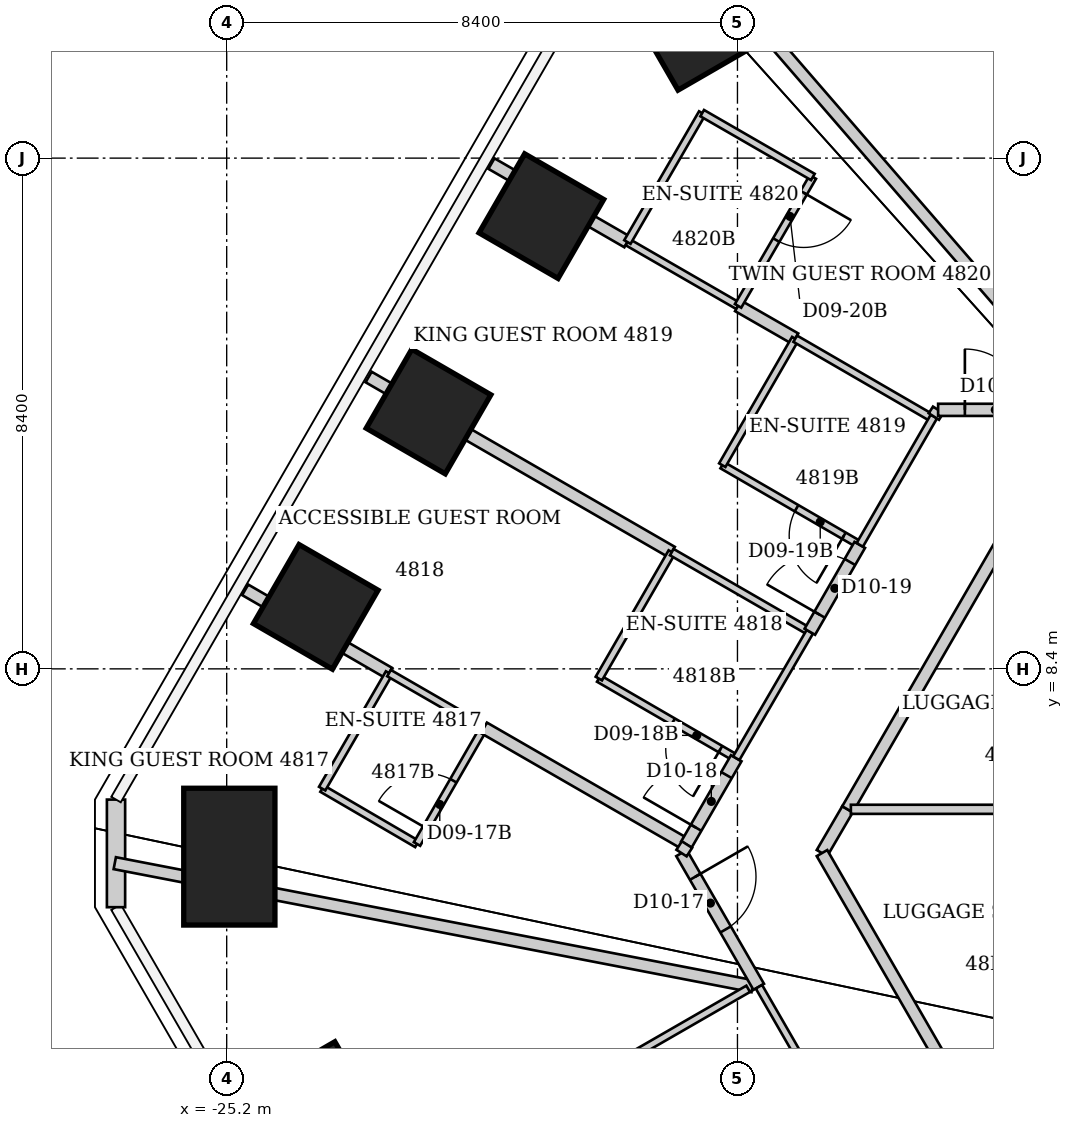
"""IFC4 building model, lengths in metres.
Left out: names, types, materials, properties, quantities, classifications, styles, units other than length and angle.
Written with IfcOpenShell. Run it as: python <this file> out.ifc"""

import sys

from ifc_helpers import new_model, si_unit, direction, frame, frame_2d, origin, origin_2d, place, context, subcontext, project, spatial, rectangle, extrude, element, fill, save


model = new_model("IFC4")
c1 = context("Model", 3, precision=1e-05, world=origin(), true_north=direction((0.0, 1.0)))
c2 = subcontext(c1, "Body", "Model", "MODEL_VIEW")
j1 = project(units=[si_unit("LENGTHUNIT", "METRE"), si_unit("PLANEANGLEUNIT", "RADIAN")], contexts=[c1])
p1 = place(None, origin())
s1 = spatial("IfcSite", under=j1, at=p1, CompositionType="ELEMENT")
p2 = place(p1, origin())
s2 = spatial("IfcBuilding", under=s1, at=p2, CompositionType="ELEMENT")
p3 = place(p2, frame((0.0, 0.0, 194.6)))
s3 = spatial("IfcBuildingStorey", under=s2, at=p3, CompositionType="ELEMENT", Elevation=194.6)
p4 = place(p3, frame((-23.696, 1.242, 0.0), z_axis=(0.0, 0.0, 1.0), x_axis=(-0.866025403784, -0.5, 0.0)))
e1 = element("IfcColumn", 1, at=p4, inside=s3, PredefinedType="COLUMN", context=c2, shape_type="SweptSolid", body=[
    extrude(rectangle(XDim=1.5, YDim=1.5, at=origin_2d()), origin(), (0.0, 0.0, 1.0), 3.8),
])
p5 = place(p3, frame((-25.156, 5.311, 0.0), z_axis=(0.0, 0.0, 1.0), x_axis=(-1.0, 0.0, 0.0)))
e2 = element("IfcColumn", 2, at=p5, inside=s3, PredefinedType="COLUMN", context=c2, shape_type="SweptSolid", body=[
    extrude(rectangle(XDim=1.5, YDim=2.25, at=origin_2d()), origin(), (0.0, 0.0, 1.0), 3.8),
])
for number, where, z_axis, x_axis in (
    (3, (-23.735, 9.419, 0.0), (0.0, 0.0, 1.0), (-0.866, 0.5, 0.0)),
    (4, (-21.88, 12.633, 0.0), (0.0, 0.0, 1.0), (-0.866, 0.5, 0.0)),
    (5, (-20.025, 15.846, 0.0), (0.0, 0.0, 1.0), (-0.866, 0.5, 0.0)),
):
    element("IfcColumn", number, at=place(p3, frame(where, z_axis=z_axis, x_axis=x_axis)), inside=s3, PredefinedType="COLUMN", context=c2, shape_type="SweptSolid", body=[
        extrude(rectangle(XDim=1.5, YDim=1.5, at=origin_2d()), origin(), (0.0, 0.0, 1.0), 3.8),
    ])
p6 = place(p3, frame((-17.178, 19.131, 0.0), z_axis=(0.0, 0.0, 1.0), x_axis=(-0.5, 0.866025403784, 0.0)))
e6 = element("IfcColumn", 6, at=p6, inside=s3, PredefinedType="COLUMN", context=c2, shape_type="SweptSolid", body=[
    extrude(rectangle(XDim=1.5, YDim=2.25, at=origin_2d()), origin(), (0.0, 0.0, 1.0), 3.8),
])
p7 = place(p3, frame((-27.02, 4.48, 0.0), z_axis=(0.0, 0.0, 1.0), x_axis=(0.0, 1.0, 0.0)))
e7 = element("IfcWall", 7, at=p7, inside=s3, PredefinedType="SOLIDWALL", context=c2, shape_type="SweptSolid", body=[
    extrude(rectangle(XDim=1.77, YDim=0.3, at=frame_2d((0.885, 0.0))), origin(), (0.0, 0.0, 1.0), 3.64),
])
p8 = place(p3, frame((-27.041, 5.204, 0.0), z_axis=(0.0, 0.0, 1.0), x_axis=(0.981884490433, -0.18948046719, 0.0)))
e8 = element("IfcWall", 8, at=p8, inside=s3, PredefinedType="PARTITIONING", context=c2, shape_type="SweptSolid", body=[
    extrude(rectangle(XDim=10.684, YDim=0.2, at=frame_2d((5.342, 0.0))), origin(), (0.0, 0.0, 1.0), 3.64),
])
p9 = place(p3, frame((-24.896, 9.7, 0.0), z_axis=(0.0, 0.0, 1.0), x_axis=(0.865432398871, -0.501025710902, 0.0)))
e9 = element("IfcWall", 9, at=p9, inside=s3, PredefinedType="PARTITIONING", context=c2, shape_type="SweptSolid", body=[
    extrude(rectangle(XDim=2.734, YDim=0.2, at=frame_2d((1.367, 0.0))), origin(), (0.0, 0.0, 1.0), 3.64),
])
p10 = place(p3, frame((-23.63, 6.43, 0.0), z_axis=(0.0, 0.0, 1.0), x_axis=(0.863773997337, -0.503879431535, 0.0)))
e10 = element("IfcWall", 10, at=p10, inside=s3, PredefinedType="PARTITIONING", context=c2, shape_type="SweptSolid", body=[
    extrude(rectangle(XDim=1.806, YDim=0.12, at=frame_2d((0.903, 0.0))), origin(), (0.0, 0.0, 1.0), 3.64),
])
p11 = place(p3, frame((-22.866, 13.2, 0.0), z_axis=(0.0, 0.0, 1.0), x_axis=(0.865937714159, -0.500151852138, 0.0)))
e11 = element("IfcWall", 11, at=p11, inside=s3, PredefinedType="PARTITIONING", context=c2, shape_type="SweptSolid", body=[
    extrude(rectangle(XDim=5.758, YDim=0.2, at=frame_2d((2.879, 0.0))), origin(), (0.0, 0.0, 1.0), 2.878),
])
p12 = place(p3, frame((-22.53, 8.33, 0.0), z_axis=(0.0, 0.0, 1.0), x_axis=(-0.500957366999, -0.865471961677, 0.0)))
e12 = element("IfcWall", 12, at=p12, inside=s3, PredefinedType="PARTITIONING", context=c2, shape_type="SweptSolid", body=[
    extrude(rectangle(XDim=2.196, YDim=0.12, at=frame_2d((1.098, 0.0))), origin(), (0.0, 0.0, 1.0), 3.64),
])
p13 = place(p3, frame((-22.53, 8.33, 0.0), z_axis=(0.0, 0.0, 1.0), x_axis=(0.866158505053, -0.499769390944, 0.0)))
e13 = element("IfcWall", 13, at=p13, inside=s3, PredefinedType="PARTITIONING", context=c2, shape_type="SweptSolid", body=[
    extrude(rectangle(XDim=1.801, YDim=0.12, at=frame_2d((0.9, 0.0))), origin(), (0.0, 0.0, 1.0), 3.64),
])
p14 = place(p3, frame((-22.07, 5.52, 0.0), z_axis=(0.0, 0.0, 1.0), x_axis=(0.499118212815, 0.866533905648, 0.0)))
e14 = element("IfcWall", 14, at=p14, inside=s3, PredefinedType="PARTITIONING", context=c2, shape_type="SweptSolid", body=[
    extrude(rectangle(XDim=2.204, YDim=0.12, at=frame_2d((1.102, 0.0))), origin(), (0.0, 0.0, 1.0), 3.64),
])
p15 = place(p14, frame((0.3, 0.0, 0.0)))
e15 = element("IfcOpeningElement", 15, at=p15, cuts=e14, PredefinedType="OPENING", context=c2, shape_type="SweptSolid", body=[
    extrude(rectangle(XDim=0.9, YDim=2.03, at=frame_2d((0.45, 1.015))), frame((0.0, 0.06, 0.0), z_axis=(0.0, -1.0, 0.0), x_axis=(1.0, 0.0, 0.0)), (0.0, 0.0, 1.0), 0.12),
])
p16 = place(p3, frame((-20.97, 7.43, 0.0), z_axis=(0.0, 0.0, 1.0), x_axis=(0.866325681624, -0.499479542482, 0.0)))
e16 = element("IfcWall", 16, at=p16, inside=s3, PredefinedType="PARTITIONING", context=c2, shape_type="SweptSolid", body=[
    extrude(rectangle(XDim=3.829, YDim=0.2, at=frame_2d((1.914, 0.0))), origin(), (0.0, 0.0, 1.0), 3.64),
])
p17 = place(p3, frame((-20.846, 16.71, 0.0), z_axis=(0.0, 0.0, 1.0), x_axis=(0.866163541035, -0.499760662899, 0.0)))
e17 = element("IfcWall", 17, at=p17, inside=s3, PredefinedType="PARTITIONING", context=c2, shape_type="SweptSolid", body=[
    extrude(rectangle(XDim=2.581, YDim=0.2, at=frame_2d((1.291, 0.0))), origin(), (0.0, 0.0, 1.0), 3.64),
])
p18 = place(p3, frame((-19.08, 8.24, 0.0), z_axis=(0.0, 0.0, 1.0), x_axis=(0.865155281359, -0.50150407689, 0.0)))
e18 = element("IfcWall", 18, at=p18, inside=s3, PredefinedType="PARTITIONING", context=c2, shape_type="SweptSolid", body=[
    extrude(rectangle(XDim=2.612, YDim=0.12, at=frame_2d((1.306, 0.0))), origin(), (0.0, 0.0, 1.0), 3.64),
])
p19 = place(p18, frame((1.412, 0.0, 0.0)))
e19 = element("IfcOpeningElement", 19, at=p19, cuts=e18, PredefinedType="OPENING", context=c2, shape_type="SweptSolid", body=[
    extrude(rectangle(XDim=0.9, YDim=2.03, at=frame_2d((0.45, 1.015))), frame((0.0, 0.06, 0.0), z_axis=(0.0, -1.0, 0.0), x_axis=(1.0, 0.0, 0.0)), (0.0, 0.0, 1.0), 0.12),
])
p20 = place(p3, frame((-18.61, 15.42, 0.0), z_axis=(0.0, 0.0, 1.0), x_axis=(0.86618365172, -0.499725806311, 0.0)))
e20 = element("IfcWall", 20, at=p20, inside=s3, PredefinedType="PARTITIONING", context=c2, shape_type="SweptSolid", body=[
    extrude(rectangle(XDim=2.101, YDim=0.12, at=frame_2d((1.051, 0.0))), origin(), (0.0, 0.0, 1.0), 3.64),
])
p21 = place(p3, frame((-17.88, 10.32, 0.0), z_axis=(0.0, 0.0, 1.0), x_axis=(-0.499769390944, -0.866158505053, 0.0)))
e21 = element("IfcWall", 21, at=p21, inside=s3, PredefinedType="PARTITIONING", context=c2, shape_type="SweptSolid", body=[
    extrude(rectangle(XDim=2.402, YDim=0.12, at=frame_2d((1.201, 0.0))), origin(), (0.0, 0.0, 1.0), 3.64),
])
p22 = place(p3, frame((-17.88, 10.32, 0.0), z_axis=(0.0, 0.0, 1.0), x_axis=(0.866114241029, -0.499846097802, 0.0)))
e22 = element("IfcWall", 22, at=p22, inside=s3, PredefinedType="PARTITIONING", context=c2, shape_type="SweptSolid", body=[
    extrude(rectangle(XDim=2.621, YDim=0.12, at=frame_2d((1.311, 0.0))), origin(), (0.0, 0.0, 1.0), 2.878),
])
p23 = place(p3, frame((-17.72, 5.37, 0.0), z_axis=(0.0, 0.0, 1.0), x_axis=(0.499922110319, -0.866070368743, 0.0)))
e23 = element("IfcWall", 23, at=p23, inside=s3, PredefinedType="PARTITIONING", context=c2, shape_type="SweptSolid", body=[
    extrude(rectangle(XDim=2.541, YDim=0.2, at=frame_2d((1.27, 0.0))), origin(), (0.0, 0.0, 1.0), 3.64),
])
p24 = place(p23, frame((0.45, 0.0, 0.0)))
e24 = element("IfcOpeningElement", 24, at=p24, cuts=e23, PredefinedType="OPENING", context=c2, shape_type="SweptSolid", body=[
    extrude(rectangle(XDim=1.0, YDim=2.13, at=frame_2d((0.5, 1.065))), frame((0.0, 0.1, 0.0), z_axis=(0.0, -1.0, 0.0), x_axis=(1.0, 0.0, 0.0)), (0.0, 0.0, 1.0), 0.2),
])
p25 = place(p3, frame((-17.64, 5.51, 0.0), z_axis=(0.0, 0.0, 1.0), x_axis=(0.500014611105, 0.866016967894, 0.0)))
e25 = element("IfcWall", 25, at=p25, inside=s3, PredefinedType="PARTITIONING", context=c2, shape_type="SweptSolid", body=[
    extrude(rectangle(XDim=1.64, YDim=0.2, at=frame_2d((0.82, 0.0))), origin(), (0.0, 0.0, 1.0), 3.64),
])
p26 = place(p25, frame((0.32, 0.0, 0.0)))
e26 = element("IfcOpeningElement", 26, at=p26, cuts=e25, PredefinedType="OPENING", context=c2, shape_type="SweptSolid", body=[
    extrude(rectangle(XDim=1.0, YDim=2.13, at=frame_2d((0.5, 1.065))), frame((0.0, 0.1, 0.0), z_axis=(0.0, -1.0, 0.0), x_axis=(1.0, 0.0, 0.0)), (0.0, 0.0, 1.0), 0.2),
])
p27 = place(p3, frame((-17.63, 5.51, 0.0), z_axis=(0.0, 0.0, 1.0), x_axis=(-0.541424846284, -0.840749151547, 0.0)))
e27 = element("IfcWall", 27, at=p27, inside=s3, PredefinedType="PARTITIONING", context=c2, shape_type="SweptSolid", body=[
    extrude(rectangle(XDim=0.167, YDim=0.2, at=frame_2d((0.083, 0.0))), origin(), (0.0, 0.0, 1.0), 3.64),
])
p28 = place(p3, frame((-17.38, 17.54, 0.0), z_axis=(0.0, 0.0, 1.0), x_axis=(-0.501888006485, -0.864932615264, 0.0)))
e28 = element("IfcWall", 28, at=p28, inside=s3, PredefinedType="PARTITIONING", context=c2, shape_type="SweptSolid", body=[
    extrude(rectangle(XDim=2.451, YDim=0.12, at=frame_2d((1.226, 0.0))), origin(), (0.0, 0.0, 1.0), 3.64),
])
p29 = place(p3, frame((-17.05, 11.75, 0.0), z_axis=(0.0, 0.0, 1.0), x_axis=(0.865155281359, -0.50150407689, 0.0)))
e29 = element("IfcWall", 29, at=p29, inside=s3, PredefinedType="PARTITIONING", context=c2, shape_type="SweptSolid", body=[
    extrude(rectangle(XDim=2.612, YDim=0.12, at=frame_2d((1.306, 0.0))), origin(), (0.0, 0.0, 1.0), 3.64),
])
p30 = place(p29, frame((1.412, 0.0, 0.0)))
e30 = element("IfcOpeningElement", 30, at=p30, cuts=e29, PredefinedType="OPENING", context=c2, shape_type="SweptSolid", body=[
    extrude(rectangle(XDim=0.9, YDim=2.03, at=frame_2d((0.45, 1.015))), frame((0.0, 0.06, 0.0), z_axis=(0.0, -1.0, 0.0), x_axis=(1.0, 0.0, 0.0)), (0.0, 0.0, 1.0), 0.12),
])
p31 = place(p3, frame((-16.82, 6.93, 0.0), z_axis=(0.0, 0.0, 1.0), x_axis=(0.502810888564, 0.864396442809, 0.0)))
e31 = element("IfcWall", 31, at=p31, inside=s3, PredefinedType="PARTITIONING", context=c2, shape_type="SweptSolid", body=[
    extrude(rectangle(XDim=2.406, YDim=0.12, at=frame_2d((1.203, 0.0))), origin(), (0.0, 0.0, 1.0), 3.64),
])
p32 = place(p3, frame((-16.79, 14.37, 0.0), z_axis=(0.0, 0.0, 1.0), x_axis=(0.867132442133, -0.498077632303, 0.0)))
e32 = element("IfcWall", 32, at=p32, inside=s3, PredefinedType="PARTITIONING", context=c2, shape_type="SweptSolid", body=[
    extrude(rectangle(XDim=1.084, YDim=0.2, at=frame_2d((0.542, 0.0))), origin(), (0.0, 0.0, 1.0), 3.64),
])
p33 = place(p3, frame((-16.79, 14.37, 0.0), z_axis=(0.0, 0.0, 1.0), x_axis=(0.501856726365, 0.86495076519, 0.0)))
e33 = element("IfcWall", 33, at=p33, inside=s3, PredefinedType="PARTITIONING", context=c2, shape_type="SweptSolid", body=[
    extrude(rectangle(XDim=2.451, YDim=0.12, at=frame_2d((1.226, 0.0))), origin(), (0.0, 0.0, 1.0), 3.64),
])
p34 = place(p33, frame((1.251, 0.0, 0.0)))
e34 = element("IfcOpeningElement", 34, at=p34, cuts=e33, PredefinedType="OPENING", context=c2, shape_type="SweptSolid", body=[
    extrude(rectangle(XDim=0.9, YDim=2.03, at=frame_2d((0.45, 1.015))), frame((0.0, 0.06, 0.0), z_axis=(0.0, -1.0, 0.0), x_axis=(1.0, 0.0, 0.0)), (0.0, 0.0, 1.0), 0.12),
])
p35 = place(p3, frame((-16.624, 3.138, 0.0), z_axis=(0.0, 0.0, 1.0), x_axis=(-0.866525185869, -0.499133351175, 0.0)))
e35 = element("IfcWall", 35, at=p35, inside=s3, PredefinedType="PARTITIONING", context=c2, shape_type="SweptSolid", body=[
    extrude(rectangle(XDim=2.5, YDim=0.12, at=frame_2d((1.25, 0.0))), origin(), (0.0, 0.0, 1.0), 3.038),
])
p36 = place(p3, frame((-16.447, 3.172, 0.0), z_axis=(0.0, 0.0, 1.0), x_axis=(0.499242543719, -0.86646227993, 0.0)))
e36 = element("IfcWall", 36, at=p36, inside=s3, PredefinedType="PARTITIONING", context=c2, shape_type="SweptSolid", body=[
    extrude(rectangle(XDim=2.437, YDim=0.12, at=frame_2d((1.219, 0.0))), origin(), (0.0, 0.0, 1.0), 3.64),
])
p37 = place(p3, frame((-15.85, 13.83, 0.0), z_axis=(0.0, 0.0, 1.0), x_axis=(-0.499693115345, -0.866202511239, 0.0)))
e37 = element("IfcWall", 37, at=p37, inside=s3, PredefinedType="PARTITIONING", context=c2, shape_type="SweptSolid", body=[
    extrude(rectangle(XDim=2.401, YDim=0.12, at=frame_2d((1.201, 0.0))), origin(), (0.0, 0.0, 1.0), 3.64),
])
p38 = place(p3, frame((-15.85, 13.83, 0.0), z_axis=(0.0, 0.0, 1.0), x_axis=(0.865155281359, -0.50150407689, 0.0)))
e38 = element("IfcWall", 38, at=p38, inside=s3, PredefinedType="PARTITIONING", context=c2, shape_type="SweptSolid", body=[
    extrude(rectangle(XDim=2.612, YDim=0.12, at=frame_2d((1.306, 0.0))), origin(), (0.0, 0.0, 1.0), 3.64),
])
p39 = place(p3, frame((-15.61, 9.01, 0.0), z_axis=(0.0, 0.0, 1.0), x_axis=(0.498354254121, 0.866973492905, 0.0)))
e39 = element("IfcWall", 39, at=p39, inside=s3, PredefinedType="PARTITIONING", context=c2, shape_type="SweptSolid", body=[
    extrude(rectangle(XDim=1.648, YDim=0.2, at=frame_2d((0.824, 0.0))), origin(), (0.0, 0.0, 1.0), 3.64),
])
p40 = place(p39, frame((0.324, 0.0, 0.0)))
e40 = element("IfcOpeningElement", 40, at=p40, cuts=e39, PredefinedType="OPENING", context=c2, shape_type="SweptSolid", body=[
    extrude(rectangle(XDim=1.0, YDim=2.13, at=frame_2d((0.5, 1.065))), frame((0.0, 0.1, 0.0), z_axis=(0.0, -1.0, 0.0), x_axis=(1.0, 0.0, 0.0)), (0.0, 0.0, 1.0), 0.2),
])
p41 = place(p3, frame((-15.56, 16.49, 0.0), z_axis=(0.0, 0.0, 1.0), x_axis=(-0.86618365172, 0.499725806311, 0.0)))
e41 = element("IfcWall", 41, at=p41, inside=s3, PredefinedType="PARTITIONING", context=c2, shape_type="SweptSolid", body=[
    extrude(rectangle(XDim=2.101, YDim=0.12, at=frame_2d((1.051, 0.0))), origin(), (0.0, 0.0, 1.0), 3.64),
])
p42 = place(p3, frame((-15.41, 5.37, 0.0), z_axis=(0.0, 0.0, 1.0), x_axis=(0.503943891868, 0.863736391412, 0.0)))
e42 = element("IfcWall", 42, at=p42, inside=s3, PredefinedType="PARTITIONING", context=c2, shape_type="SweptSolid", body=[
    extrude(rectangle(XDim=0.833, YDim=0.2, at=frame_2d((0.417, 0.0))), origin(), (0.0, 0.0, 1.0), 3.64),
])
p43 = place(p3, frame((-14.99, 6.09, 0.0), z_axis=(0.0, 0.0, 1.0), x_axis=(0.500213626659, 0.86590203124, 0.0)))
e43 = element("IfcWall", 43, at=p43, inside=s3, PredefinedType="PARTITIONING", context=c2, shape_type="SweptSolid", body=[
    extrude(rectangle(XDim=5.278, YDim=0.2, at=frame_2d((2.639, 0.0))), origin(), (0.0, 0.0, 1.0), 3.64),
])
p44 = place(p3, frame((-14.935, 6.09, 0.0), z_axis=(0.0, 0.0, 1.0), x_axis=(1.0, 0.0, 0.0)))
e44 = element("IfcWall", 44, at=p44, inside=s3, PredefinedType="PARTITIONING", context=c2, shape_type="SweptSolid", body=[
    extrude(rectangle(XDim=4.385, YDim=0.15, at=frame_2d((2.192, 0.0))), origin(), (0.0, 0.0, 1.0), 3.64),
])
p45 = place(p3, frame((-14.789, 10.439, 0.0), z_axis=(0.0, 0.0, 1.0), x_axis=(0.499942119333, 0.866058818624, 0.0)))
e45 = element("IfcWall", 45, at=p45, inside=s3, PredefinedType="PARTITIONING", context=c2, shape_type="SweptSolid", body=[
    extrude(rectangle(XDim=2.437, YDim=0.12, at=frame_2d((1.219, 0.0))), origin(), (0.0, 0.0, 1.0), 3.64),
])
p46 = place(p3, frame((-13.5, 12.66, 0.0), z_axis=(0.0, 0.0, 1.0), x_axis=(-0.537723852201, -0.843121022614, 0.0)))
e46 = element("IfcWall", 46, at=p46, inside=s3, PredefinedType="PARTITIONING", context=c2, shape_type="SweptSolid", body=[
    extrude(rectangle(XDim=0.13, YDim=0.2, at=frame_2d((0.065, 0.0))), origin(), (0.0, 0.0, 1.0), 3.64),
])
p47 = place(p3, frame((-13.19, 1.52, 0.0), z_axis=(0.0, 0.0, 1.0), x_axis=(-0.499513190454, 0.866306281036, 0.0)))
e47 = element("IfcWall", 47, at=p47, inside=s3, PredefinedType="PARTITIONING", context=c2, shape_type="SweptSolid", body=[
    extrude(rectangle(XDim=4.444, YDim=0.2, at=frame_2d((2.222, 0.0))), origin(), (0.0, 0.0, 1.0), 3.64),
])
p48 = place(p3, frame((-11.025, 12.736, 0.0), z_axis=(0.0, 0.0, 1.0), x_axis=(-0.654431245438, 0.756121514702, 0.0)))
e48 = element("IfcWall", 48, at=p48, inside=s3, PredefinedType="PARTITIONING", context=c2, shape_type="SweptSolid", body=[
    extrude(rectangle(XDim=10.688, YDim=0.2, at=frame_2d((5.344, 0.0))), origin(), (0.0, 0.0, 1.0), 3.64),
])
p49 = place(p3, frame((-10.96, 12.66, 0.0), z_axis=(0.0, 0.0, 1.0), x_axis=(-1.0, 0.0, 0.0)))
e49 = element("IfcWall", 49, at=p49, inside=s3, PredefinedType="PARTITIONING", context=c2, shape_type="SweptSolid", body=[
    extrude(rectangle(XDim=2.54, YDim=0.2, at=frame_2d((1.27, 0.0))), origin(), (0.0, 0.0, 1.0), 3.64),
])
p50 = place(p49, frame((1.1, 0.0, 0.0)))
e50 = element("IfcOpeningElement", 50, at=p50, cuts=e49, PredefinedType="OPENING", context=c2, shape_type="SweptSolid", body=[
    extrude(rectangle(XDim=1.0, YDim=2.13, at=frame_2d((0.5, 1.065))), frame((0.0, 0.1, 0.0), z_axis=(0.0, -1.0, 0.0), x_axis=(1.0, 0.0, 0.0)), (0.0, 0.0, 1.0), 0.2),
])
p51 = place(p24, origin())
e51 = element("IfcDoor", 51, at=p51, inside=s3, OperationType="SINGLE_SWING_LEFT", PredefinedType="DOOR", context=c2, shape_type="SweptSolid", body=[
    extrude(rectangle(XDim=1.0, YDim=2.13, at=frame_2d((0.5, 1.065))), frame((0.0, 0.025, 0.0), z_axis=(0.0, -1.0, 0.0), x_axis=(1.0, 0.0, 0.0)), (0.0, 0.0, 1.0), 0.05),
])
fill(e24, e51)
p52 = place(p15, origin())
e52 = element("IfcDoor", 52, at=p52, inside=s3, OperationType="SINGLE_SWING_LEFT", PredefinedType="DOOR", context=c2, shape_type="SweptSolid", body=[
    extrude(rectangle(XDim=0.9, YDim=2.03, at=frame_2d((0.45, 1.015))), frame((0.0, 0.025, 0.0), z_axis=(0.0, -1.0, 0.0), x_axis=(1.0, 0.0, 0.0)), (0.0, 0.0, 1.0), 0.05),
])
fill(e15, e52)
p53 = place(p26, origin())
e53 = element("IfcDoor", 53, at=p53, inside=s3, OperationType="SINGLE_SWING_LEFT", PredefinedType="DOOR", context=c2, shape_type="SweptSolid", body=[
    extrude(rectangle(XDim=1.0, YDim=2.13, at=frame_2d((0.5, 1.065))), frame((0.0, 0.025, 0.0), z_axis=(0.0, -1.0, 0.0), x_axis=(1.0, 0.0, 0.0)), (0.0, 0.0, 1.0), 0.05),
])
fill(e26, e53)
p54 = place(p19, origin())
e54 = element("IfcDoor", 54, at=p54, inside=s3, OperationType="SINGLE_SWING_RIGHT", PredefinedType="DOOR", context=c2, shape_type="SweptSolid", body=[
    extrude(rectangle(XDim=0.9, YDim=2.03, at=frame_2d((0.45, 1.015))), frame((0.0, 0.025, 0.0), z_axis=(0.0, -1.0, 0.0), x_axis=(1.0, 0.0, 0.0)), (0.0, 0.0, 1.0), 0.05),
])
fill(e19, e54)
p55 = place(p40, origin())
e55 = element("IfcDoor", 55, at=p55, inside=s3, OperationType="SINGLE_SWING_LEFT", PredefinedType="DOOR", context=c2, shape_type="SweptSolid", body=[
    extrude(rectangle(XDim=1.0, YDim=2.13, at=frame_2d((0.5, 1.065))), frame((0.0, 0.025, 0.0), z_axis=(0.0, -1.0, 0.0), x_axis=(1.0, 0.0, 0.0)), (0.0, 0.0, 1.0), 0.05),
])
fill(e40, e55)
p56 = place(p30, origin())
e56 = element("IfcDoor", 56, at=p56, inside=s3, OperationType="SINGLE_SWING_RIGHT", PredefinedType="DOOR", context=c2, shape_type="SweptSolid", body=[
    extrude(rectangle(XDim=0.9, YDim=2.03, at=frame_2d((0.45, 1.015))), frame((0.0, 0.025, 0.0), z_axis=(0.0, -1.0, 0.0), x_axis=(1.0, 0.0, 0.0)), (0.0, 0.0, 1.0), 0.05),
])
fill(e30, e56)
p57 = place(p50, origin())
e57 = element("IfcDoor", 57, at=p57, inside=s3, OperationType="SINGLE_SWING_RIGHT", PredefinedType="DOOR", context=c2, shape_type="SweptSolid", body=[
    extrude(rectangle(XDim=1.0, YDim=2.13, at=frame_2d((0.5, 1.065))), frame((0.0, 0.025, 0.0), z_axis=(0.0, -1.0, 0.0), x_axis=(1.0, 0.0, 0.0)), (0.0, 0.0, 1.0), 0.05),
])
fill(e50, e57)
p58 = place(p34, origin())
e58 = element("IfcDoor", 58, at=p58, inside=s3, OperationType="SINGLE_SWING_RIGHT", PredefinedType="DOOR", context=c2, shape_type="SweptSolid", body=[
    extrude(rectangle(XDim=0.9, YDim=2.03, at=frame_2d((0.45, 1.015))), frame((0.0, 0.025, 0.0), z_axis=(0.0, -1.0, 0.0), x_axis=(1.0, 0.0, 0.0)), (0.0, 0.0, 1.0), 0.05),
])
fill(e34, e58)
save(model, sys.argv[1])
